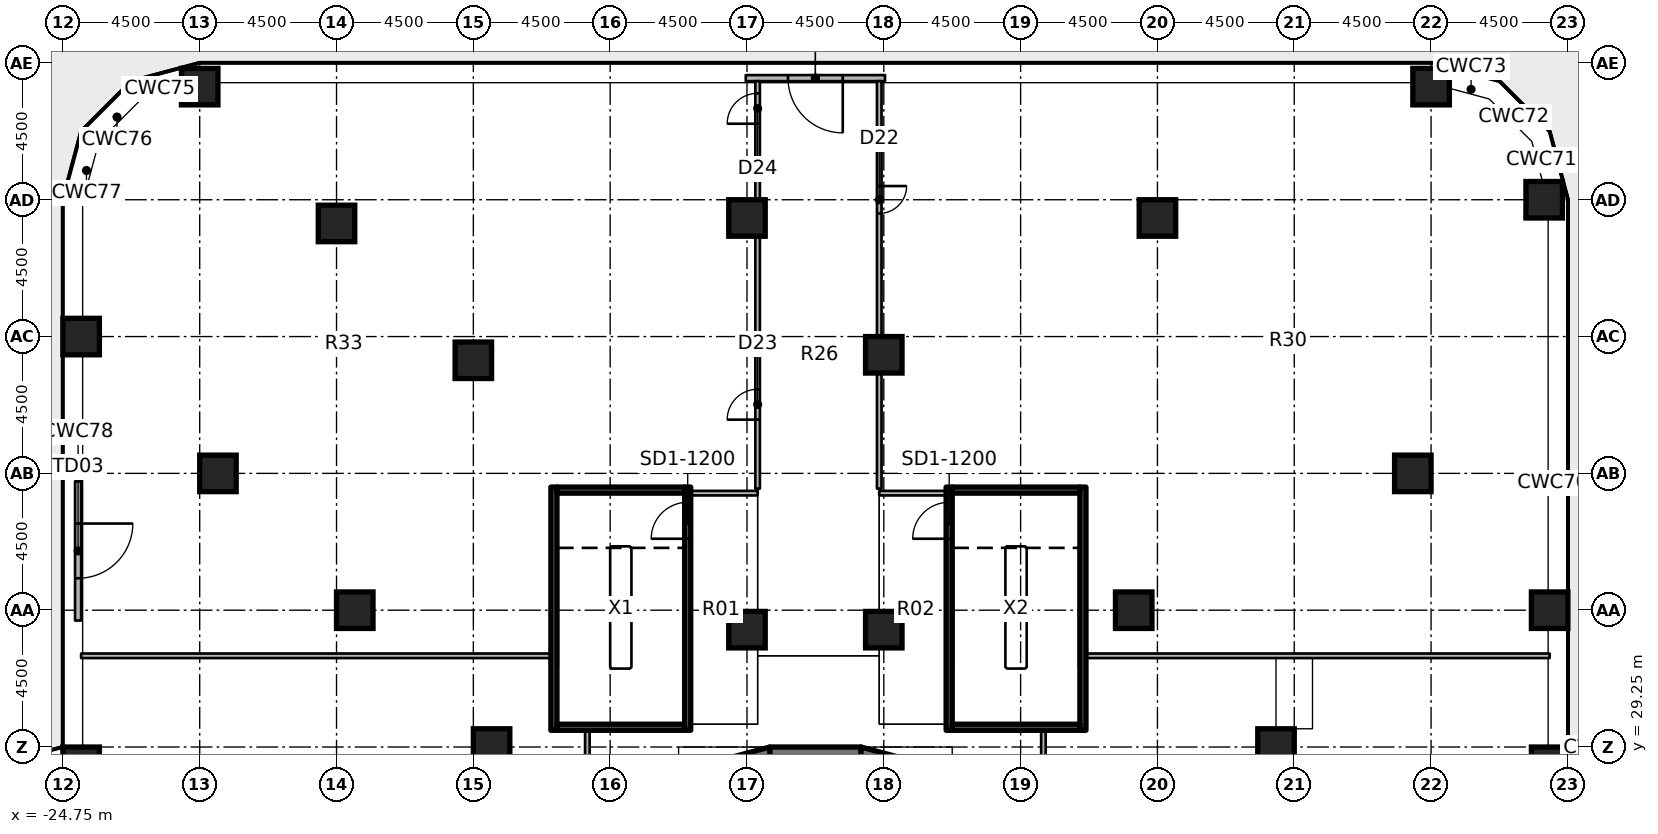
"""IFC4 building model, lengths in metres.
Left out: names, types, materials, properties, quantities, classifications, styles, units other than length and angle.
Written with IfcOpenShell. Run it as: python <this file> out.ifc"""

import sys

from ifc_helpers import new_model, si_unit, direction, frame, frame_2d, origin, origin_2d, place, context, subcontext, project, spatial, polyline, rectangle, outline, extrude, element, fill, save


model = new_model("IFC4")
c1 = context("Model", 3, precision=1e-05, world=origin(), true_north=direction((0.0, 1.0)))
c2 = subcontext(c1, "Body", "Model", "MODEL_VIEW")
j1 = project(units=[si_unit("LENGTHUNIT", "METRE"), si_unit("PLANEANGLEUNIT", "RADIAN")], contexts=[c1])
p1 = place(None, origin())
s1 = spatial("IfcSite", under=j1, at=p1, CompositionType="ELEMENT")
p2 = place(p1, origin())
s2 = spatial("IfcBuilding", under=s1, at=p2, CompositionType="ELEMENT")
p3 = place(p2, frame((0.0, 0.0, 7.0)))
s3 = spatial("IfcBuildingStorey", under=s2, at=p3, CompositionType="ELEMENT", Elevation=7.0)
for number, where, z_axis, x_axis in (
    (1, (-24.15, 28.65, 0.0), (0.0, 0.0, 1.0), (1.0, 0.0, 0.0)),
    (2, (-24.15, 42.75, 0.0), (0.0, 0.0, 1.0), (1.0, 0.0, 0.0)),
    (3, (-19.65, 38.25, 0.0), (0.0, 0.0, 1.0), (1.0, 0.0, 0.0)),
    (4, (-20.25, 50.97, 0.0), (0.0, 0.0, 1.0), (1.0, 0.0, 0.0)),
    (5, (-15.15, 33.75, 0.0), (0.0, 0.0, 1.0), (1.0, 0.0, 0.0)),
    (6, (-15.75, 46.47, 0.0), (0.0, 0.0, 1.0), (1.0, 0.0, 0.0)),
    (7, (-10.65, 29.25, 0.0), (0.0, 0.0, 1.0), (1.0, 0.0, 0.0)),
    (8, (-11.25, 41.97, 0.0), (0.0, 0.0, 1.0), (1.0, 0.0, 0.0)),
    (9, (-2.25, 33.11, 0.0), (0.0, 0.0, 1.0), (1.0, 0.0, 0.0)),
    (10, (-2.25, 46.65, 0.0), (0.0, 0.0, 1.0), (1.0, 0.0, 0.0)),
    (11, (2.25, 33.11, 0.0), (0.0, 0.0, 1.0), (1.0, 0.0, 0.0)),
    (12, (2.25, 42.15, 0.0), (0.0, 0.0, 1.0), (1.0, 0.0, 0.0)),
    (13, (10.47, 33.75, 0.0), (0.0, 0.0, 1.0), (1.0, 0.0, 0.0)),
    (14, (11.25, 46.65, 0.0), (0.0, 0.0, 1.0), (1.0, 0.0, 0.0)),
    (15, (15.15, 29.25, 0.0), (0.0, 0.0, 1.0), (1.0, 0.0, 0.0)),
    (16, (19.65, 38.25, 0.0), (0.0, 0.0, 1.0), (1.0, 0.0, 0.0)),
    (17, (20.25, 50.97, 0.0), (0.0, 0.0, 1.0), (1.0, 0.0, 0.0)),
    (18, (24.15, 28.65, 0.0), (0.0, 0.0, 1.0), (1.0, 0.0, 0.0)),
    (19, (24.15, 33.75, 0.0), (0.0, 0.0, 1.0), (1.0, 0.0, 0.0)),
    (20, (23.97, 47.25, 0.0), (0.0, 0.0, 1.0), (1.0, 0.0, 0.0)),
):
    element("IfcColumn", number, at=place(p3, frame(where, z_axis=z_axis, x_axis=x_axis)), inside=s3, PredefinedType="COLUMN", context=c2, shape_type="SweptSolid", body=[
        extrude(rectangle(XDim=1.2, YDim=1.2, at=origin_2d()), origin(), (0.0, 0.0, 1.0), 4.55),
    ])
p4 = place(p3, frame((-1.5, 28.8, 0.0), z_axis=(0.0, 0.0, 1.0), x_axis=(1.0, 0.0, 0.0)))
e21 = element("IfcWall", 21, at=p4, inside=s3, PredefinedType="SHEAR", context=c2, shape_type="SweptSolid", body=[
    extrude(rectangle(XDim=3.0, YDim=0.9, at=frame_2d((1.5, 0.0))), origin(), (0.0, 0.0, 1.0), 5.0),
])
p5 = place(p3, origin())
e22 = element("IfcWall", 22, at=p5, inside=s3, PredefinedType="SHEAR", context=c2, shape_type="SweptSolid", body=[
    extrude(outline(polyline([(-3.0, 28.848), (-1.5, 29.25), (-1.5, 28.35), (-2.55, 28.069), (-3.0, 28.848)])), origin(), (0.0, 0.0, 1.0), 5.0),
])
p6 = place(p3, origin())
e23 = element("IfcWall", 23, at=p6, inside=s3, PredefinedType="SHEAR", context=c2, shape_type="SweptSolid", body=[
    extrude(outline(polyline([(3.0, 28.848), (1.5, 29.25), (1.5, 28.35), (2.55, 28.069), (3.0, 28.848)])), origin(), (0.0, 0.0, 1.0), 5.0),
])
p7 = place(p3, frame((2.29, 51.25, 0.0), z_axis=(0.0, 0.0, 1.0), x_axis=(-1.0, 0.0, 0.0)))
e24 = element("IfcWall", 24, at=p7, inside=s3, PredefinedType="SOLIDWALL", context=c2, shape_type="SweptSolid", body=[
    extrude(rectangle(XDim=4.58, YDim=0.2, at=frame_2d((2.29, 0.0))), origin(), (0.0, 0.0, 1.0), 4.55),
])
p8 = place(p7, frame((1.39, 0.0, 0.0)))
e25 = element("IfcOpeningElement", 25, at=p8, cuts=e24, PredefinedType="OPENING", context=c2, shape_type="SweptSolid", body=[
    extrude(rectangle(XDim=1.8, YDim=2.4, at=frame_2d((0.9, 1.2))), frame((0.0, 0.11, 0.0), z_axis=(0.0, -1.0, 0.0), x_axis=(1.0, 0.0, 0.0)), (0.0, 0.0, 1.0), 0.22),
])
p9 = place(p3, frame((-24.25, 37.99, 0.0), z_axis=(0.0, 0.0, 1.0), x_axis=(0.0, -1.0, 0.0)))
e26 = element("IfcWall", 26, at=p9, inside=s3, PredefinedType="SOLIDWALL", context=c2, shape_type="SweptSolid", body=[
    extrude(rectangle(XDim=4.58, YDim=0.2, at=frame_2d((2.29, 0.0))), origin(), (0.0, 0.0, 1.0), 4.55),
])
p10 = place(p9, frame((1.39, 0.0, 0.0)))
e27 = element("IfcOpeningElement", 27, at=p10, cuts=e26, PredefinedType="OPENING", context=c2, shape_type="SweptSolid", body=[
    extrude(rectangle(XDim=1.8, YDim=2.4, at=frame_2d((0.9, 1.2))), frame((0.0, 0.11, 0.0), z_axis=(0.0, -1.0, 0.0), x_axis=(1.0, 0.0, 0.0)), (0.0, 0.0, 1.0), 0.22),
])
p11 = place(p3, frame((-8.6, 29.8, 0.0), z_axis=(0.0, 0.0, 1.0), x_axis=(0.0, 1.0, 0.0)))
e28 = element("IfcWall", 28, at=p11, inside=s3, PredefinedType="SHEAR", context=c2, shape_type="SweptSolid", body=[
    extrude(rectangle(XDim=8.0, YDim=0.2, at=frame_2d((4.0, 0.0))), origin(), (0.0, 0.0, 1.0), 4.55),
])
p12 = place(p3, frame((-4.2, 29.8, 0.0), z_axis=(0.0, 0.0, 1.0), x_axis=(0.0, 1.0, 0.0)))
e29 = element("IfcWall", 29, at=p12, inside=s3, PredefinedType="SHEAR", context=c2, shape_type="SweptSolid", body=[
    extrude(rectangle(XDim=8.0, YDim=0.2, at=frame_2d((4.0, 0.0))), origin(), (0.0, 0.0, 1.0), 4.55),
])
p13 = place(p12, frame((6.3, 0.0, 0.0)))
e30 = element("IfcOpeningElement", 30, at=p13, cuts=e29, PredefinedType="OPENING", context=c2, shape_type="SweptSolid", body=[
    extrude(rectangle(XDim=1.2, YDim=2.1, at=frame_2d((0.6, 1.05))), frame((0.0, 0.11, 0.0), z_axis=(0.0, -1.0, 0.0), x_axis=(1.0, 0.0, 0.0)), (0.0, 0.0, 1.0), 0.22),
])
for number, where, z_axis, x_axis in (
    (31, (-8.5, 29.9, 0.0), (0.0, 0.0, 1.0), (1.0, 0.0, 0.0)),
    (32, (-8.5, 37.7, 0.0), (0.0, 0.0, 1.0), (1.0, 0.0, 0.0)),
):
    element("IfcWall", number, at=place(p3, frame(where, z_axis=z_axis, x_axis=x_axis)), inside=s3, PredefinedType="SHEAR", context=c2, shape_type="SweptSolid", body=[
        extrude(rectangle(XDim=4.2, YDim=0.2, at=frame_2d((2.1, 0.0))), origin(), (0.0, 0.0, 1.0), 4.55),
    ])
p14 = place(p3, frame((4.4, 29.8, 0.0), z_axis=(0.0, 0.0, 1.0), x_axis=(0.0, 1.0, 0.0)))
e33 = element("IfcWall", 33, at=p14, inside=s3, PredefinedType="SHEAR", context=c2, shape_type="SweptSolid", body=[
    extrude(rectangle(XDim=8.0, YDim=0.2, at=frame_2d((4.0, 0.0))), origin(), (0.0, 0.0, 1.0), 4.55),
])
p15 = place(p14, frame((6.3, 0.0, 0.0)))
e34 = element("IfcOpeningElement", 34, at=p15, cuts=e33, PredefinedType="OPENING", context=c2, shape_type="SweptSolid", body=[
    extrude(rectangle(XDim=1.2, YDim=2.1, at=frame_2d((0.6, 1.05))), frame((0.0, 0.11, 0.0), z_axis=(0.0, -1.0, 0.0), x_axis=(1.0, 0.0, 0.0)), (0.0, 0.0, 1.0), 0.22),
])
p16 = place(p3, frame((8.8, 29.8, 0.0), z_axis=(0.0, 0.0, 1.0), x_axis=(0.0, 1.0, 0.0)))
e35 = element("IfcWall", 35, at=p16, inside=s3, PredefinedType="SHEAR", context=c2, shape_type="SweptSolid", body=[
    extrude(rectangle(XDim=8.0, YDim=0.2, at=frame_2d((4.0, 0.0))), origin(), (0.0, 0.0, 1.0), 4.55),
])
for number, where, z_axis, x_axis in (
    (36, (4.5, 29.9, 0.0), (0.0, 0.0, 1.0), (1.0, 0.0, 0.0)),
    (37, (4.5, 37.7, 0.0), (0.0, 0.0, 1.0), (1.0, 0.0, 0.0)),
):
    element("IfcWall", number, at=place(p3, frame(where, z_axis=z_axis, x_axis=x_axis)), inside=s3, PredefinedType="SHEAR", context=c2, shape_type="SweptSolid", body=[
        extrude(rectangle(XDim=4.2, YDim=0.2, at=frame_2d((2.1, 0.0))), origin(), (0.0, 0.0, 1.0), 4.55),
    ])
p17 = place(p3, frame((-4.1, 37.6, 0.0), z_axis=(0.0, 0.0, 1.0), x_axis=(1.0, 0.0, 0.0)))
e38 = element("IfcWall", 38, at=p17, inside=s3, PredefinedType="PARTITIONING", context=c2, shape_type="SweptSolid", body=[
    extrude(rectangle(XDim=2.2, YDim=0.15, at=frame_2d((1.1, 0.0))), origin(), (0.0, 0.0, 1.0), 4.55),
])
p18 = place(p3, frame((2.1, 37.6, 0.0), z_axis=(0.0, 0.0, 1.0), x_axis=(1.0, 0.0, 0.0)))
e39 = element("IfcWall", 39, at=p18, inside=s3, PredefinedType="PARTITIONING", context=c2, shape_type="SweptSolid", body=[
    extrude(rectangle(XDim=2.2, YDim=0.15, at=frame_2d((1.1, 0.0))), origin(), (0.0, 0.0, 1.0), 4.55),
])
p19 = place(p3, frame((7.5, 30.0, 0.0), z_axis=(0.0, 0.0, 1.0), x_axis=(0.0, -1.0, 0.0)))
e40 = element("IfcWall", 40, at=p19, inside=s3, PredefinedType="PARTITIONING", context=c2, shape_type="SweptSolid", body=[
    extrude(rectangle(XDim=21.75, YDim=0.15, at=frame_2d((10.875, 0.0))), origin(), (0.0, 0.0, 1.0), 4.55),
])
p20 = place(p19, frame((6.75, 0.0, 0.0)))
e41 = element("IfcOpeningElement", 41, at=p20, cuts=e40, PredefinedType="OPENING", context=c2, shape_type="SweptSolid", body=[
    extrude(rectangle(XDim=1.0, YDim=2.1, at=frame_2d((0.5, 1.05))), frame((0.0, 0.085, 0.0), z_axis=(0.0, -1.0, 0.0), x_axis=(1.0, 0.0, 0.0)), (0.0, 0.0, 1.0), 0.17),
])
p21 = place(p3, frame((-7.5, 8.25, 0.0), z_axis=(0.0, 0.0, 1.0), x_axis=(0.0, 1.0, 0.0)))
e42 = element("IfcWall", 42, at=p21, inside=s3, PredefinedType="PARTITIONING", context=c2, shape_type="SweptSolid", body=[
    extrude(rectangle(XDim=21.75, YDim=0.15, at=frame_2d((10.875, 0.0))), origin(), (0.0, 0.0, 1.0), 4.55),
])
p22 = place(p21, frame((5.75, 0.0, 0.0)))
e43 = element("IfcOpeningElement", 43, at=p22, cuts=e42, PredefinedType="OPENING", context=c2, shape_type="SweptSolid", body=[
    extrude(rectangle(XDim=1.0, YDim=2.1, at=frame_2d((0.5, 1.05))), frame((0.0, 0.085, 0.0), z_axis=(0.0, -1.0, 0.0), x_axis=(1.0, 0.0, 0.0)), (0.0, 0.0, 1.0), 0.17),
])
p23 = place(p3, frame((2.1, 51.15, 0.0), z_axis=(0.0, 0.0, 1.0), x_axis=(0.0, -1.0, 0.0)))
e44 = element("IfcWall", 44, at=p23, inside=s3, PredefinedType="PARTITIONING", context=c2, shape_type="SweptSolid", body=[
    extrude(rectangle(XDim=8.4, YDim=0.15, at=frame_2d((4.2, 0.0))), origin(), (0.0, 0.0, 1.0), 4.55),
])
p24 = place(p23, frame((3.45, 0.0, 0.0)))
e45 = element("IfcOpeningElement", 45, at=p24, cuts=e44, PredefinedType="OPENING", context=c2, shape_type="SweptSolid", body=[
    extrude(rectangle(XDim=0.9, YDim=2.1, at=frame_2d((0.45, 1.05))), frame((0.0, 0.085, 0.0), z_axis=(0.0, -1.0, 0.0), x_axis=(1.0, 0.0, 0.0)), (0.0, 0.0, 1.0), 0.17),
])
p25 = place(p3, frame((2.1, 41.55, 0.0), z_axis=(0.0, 0.0, 1.0), x_axis=(0.0, -1.0, 0.0)))
e46 = element("IfcWall", 46, at=p25, inside=s3, PredefinedType="PARTITIONING", context=c2, shape_type="SweptSolid", body=[
    extrude(rectangle(XDim=3.8, YDim=0.15, at=frame_2d((1.9, 0.0))), origin(), (0.0, 0.0, 1.0), 4.55),
])
p26 = place(p3, frame((-1.9, 37.75, 0.0), z_axis=(0.0, 0.0, 1.0), x_axis=(0.0, 1.0, 0.0)))
e47 = element("IfcWall", 47, at=p26, inside=s3, PredefinedType="PARTITIONING", context=c2, shape_type="SweptSolid", body=[
    extrude(rectangle(XDim=8.3, YDim=0.15, at=frame_2d((4.15, 0.0))), origin(), (0.0, 0.0, 1.0), 4.55),
])
p27 = place(p26, frame((2.267, 0.0, 0.0)))
e48 = element("IfcOpeningElement", 48, at=p27, cuts=e47, PredefinedType="OPENING", context=c2, shape_type="SweptSolid", body=[
    extrude(rectangle(XDim=1.0, YDim=2.1, at=frame_2d((0.5, 1.05))), frame((0.0, 0.085, 0.0), z_axis=(0.0, -1.0, 0.0), x_axis=(1.0, 0.0, 0.0)), (0.0, 0.0, 1.0), 0.17),
])
p28 = place(p3, frame((-1.9, 47.25, 0.0), z_axis=(0.0, 0.0, 1.0), x_axis=(0.0, 1.0, 0.0)))
e49 = element("IfcWall", 49, at=p28, inside=s3, PredefinedType="PARTITIONING", context=c2, shape_type="SweptSolid", body=[
    extrude(rectangle(XDim=3.9, YDim=0.15, at=frame_2d((1.95, 0.0))), origin(), (0.0, 0.0, 1.0), 4.55),
])
p29 = place(p28, frame((2.5, 0.0, 0.0)))
e50 = element("IfcOpeningElement", 50, at=p29, cuts=e49, PredefinedType="OPENING", context=c2, shape_type="SweptSolid", body=[
    extrude(rectangle(XDim=1.0, YDim=2.1, at=frame_2d((0.5, 1.05))), frame((0.0, 0.085, 0.0), z_axis=(0.0, -1.0, 0.0), x_axis=(1.0, 0.0, 0.0)), (0.0, 0.0, 1.0), 0.17),
])
p30 = place(p3, frame((8.9, 32.25, 0.0), z_axis=(0.0, 0.0, 1.0), x_axis=(1.0, 0.0, 0.0)))
e51 = element("IfcWall", 51, at=p30, inside=s3, PredefinedType="PARTITIONING", context=c2, shape_type="SweptSolid", body=[
    extrude(rectangle(XDim=15.25, YDim=0.15, at=frame_2d((7.625, 0.0))), origin(), (0.0, 0.0, 1.0), 4.55),
])
p31 = place(p3, frame((-24.15, 32.25, 0.0), z_axis=(0.0, 0.0, 1.0), x_axis=(1.0, 0.0, 0.0)))
e52 = element("IfcWall", 52, at=p31, inside=s3, PredefinedType="PARTITIONING", context=c2, shape_type="SweptSolid", body=[
    extrude(rectangle(XDim=15.45, YDim=0.15, at=frame_2d((7.725, 0.0))), origin(), (0.0, 0.0, 1.0), 4.55),
])
p32 = place(p8, origin())
e53 = element("IfcDoor", 53, at=p32, inside=s3, OperationType="SINGLE_SWING_LEFT", PredefinedType="DOOR", context=c2, shape_type="SweptSolid", body=[
    extrude(rectangle(XDim=1.8, YDim=2.4, at=frame_2d((0.9, 1.2))), frame((0.0, 0.025, 0.0), z_axis=(0.0, -1.0, 0.0), x_axis=(1.0, 0.0, 0.0)), (0.0, 0.0, 1.0), 0.05),
])
fill(e25, e53)
p33 = place(p10, origin())
e54 = element("IfcDoor", 54, at=p33, inside=s3, OperationType="SINGLE_SWING_LEFT", PredefinedType="DOOR", context=c2, shape_type="SweptSolid", body=[
    extrude(rectangle(XDim=1.8, YDim=2.4, at=frame_2d((0.9, 1.2))), frame((0.0, 0.025, 0.0), z_axis=(0.0, -1.0, 0.0), x_axis=(1.0, 0.0, 0.0)), (0.0, 0.0, 1.0), 0.05),
])
fill(e27, e54)
p34 = place(p13, origin())
e55 = element("IfcDoor", 55, at=p34, inside=s3, OperationType="SINGLE_SWING_RIGHT", PredefinedType="DOOR", context=c2, shape_type="SweptSolid", body=[
    extrude(rectangle(XDim=1.2, YDim=2.1, at=frame_2d((0.6, 1.05))), frame((0.0, 0.025, 0.0), z_axis=(0.0, -1.0, 0.0), x_axis=(1.0, 0.0, 0.0)), (0.0, 0.0, 1.0), 0.05),
])
fill(e30, e55)
p35 = place(p15, origin())
e56 = element("IfcDoor", 56, at=p35, inside=s3, OperationType="SINGLE_SWING_LEFT", PredefinedType="DOOR", context=c2, shape_type="SweptSolid", body=[
    extrude(rectangle(XDim=1.2, YDim=2.1, at=frame_2d((0.6, 1.05))), frame((0.0, 0.025, 0.0), z_axis=(0.0, -1.0, 0.0), x_axis=(1.0, 0.0, 0.0)), (0.0, 0.0, 1.0), 0.05),
])
fill(e34, e56)
p36 = place(p24, origin())
e57 = element("IfcDoor", 57, at=p36, inside=s3, OperationType="SINGLE_SWING_LEFT", PredefinedType="DOOR", context=c2, shape_type="SweptSolid", body=[
    extrude(rectangle(XDim=0.9, YDim=2.1, at=frame_2d((0.45, 1.05))), frame((0.0, 0.025, 0.0), z_axis=(0.0, -1.0, 0.0), x_axis=(1.0, 0.0, 0.0)), (0.0, 0.0, 1.0), 0.05),
])
fill(e45, e57)
p37 = place(p27, origin())
e58 = element("IfcDoor", 58, at=p37, inside=s3, OperationType="SINGLE_SWING_LEFT", PredefinedType="DOOR", context=c2, shape_type="SweptSolid", body=[
    extrude(rectangle(XDim=1.0, YDim=2.1, at=frame_2d((0.5, 1.05))), frame((0.0, 0.025, 0.0), z_axis=(0.0, -1.0, 0.0), x_axis=(1.0, 0.0, 0.0)), (0.0, 0.0, 1.0), 0.05),
])
fill(e48, e58)
p38 = place(p29, origin())
e59 = element("IfcDoor", 59, at=p38, inside=s3, OperationType="SINGLE_SWING_LEFT", PredefinedType="DOOR", context=c2, shape_type="SweptSolid", body=[
    extrude(rectangle(XDim=1.0, YDim=2.1, at=frame_2d((0.5, 1.05))), frame((0.0, 0.025, 0.0), z_axis=(0.0, -1.0, 0.0), x_axis=(1.0, 0.0, 0.0)), (0.0, 0.0, 1.0), 0.05),
])
fill(e50, e59)
save(model, sys.argv[1])
